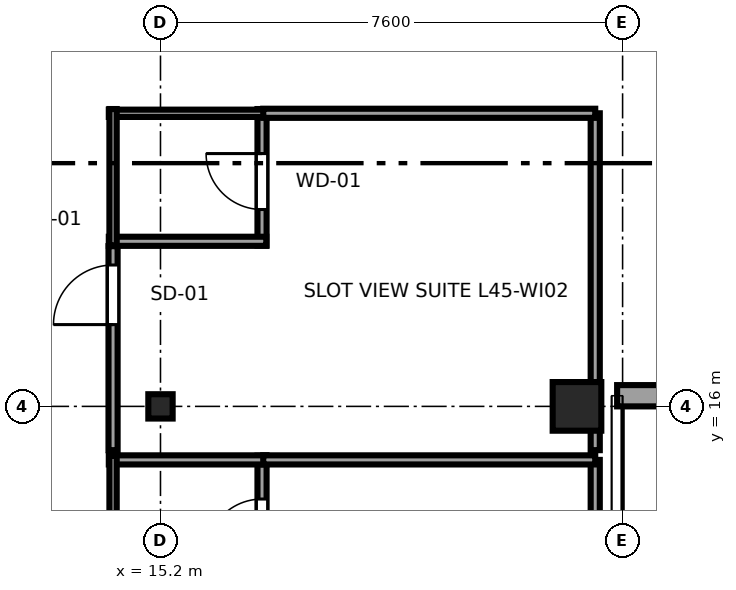
"""IFC4 building model, lengths in metres.
Left out: names, types, materials, properties, quantities, classifications, styles, units other than length and angle.
Written with IfcOpenShell. Run it as: python <this file> out.ifc"""

import sys

from ifc_helpers import new_model, si_unit, direction, frame, frame_2d, origin, origin_2d, place, context, subcontext, project, spatial, rectangle, i_section, extrude, source, transform, mapped, element, fill, save


model = new_model("IFC4")
c1 = context("Model", 3, precision=1e-05, world=origin(), true_north=direction((0.0, 1.0)))
c2 = subcontext(c1, "Body", "Model", "MODEL_VIEW")
j1 = project(units=[si_unit("LENGTHUNIT", "METRE"), si_unit("PLANEANGLEUNIT", "RADIAN")], contexts=[c1])
p1 = place(None, origin())
s1 = spatial("IfcSite", under=j1, at=p1, CompositionType="ELEMENT")
p2 = place(p1, origin())
s2 = spatial("IfcBuilding", under=s1, at=p2, CompositionType="ELEMENT")
p3 = place(p2, frame((0.0, 0.0, 171.9)))
s3 = spatial("IfcBuildingStorey", under=s2, at=p3, CompositionType="ELEMENT", Elevation=171.9)
m1 = source(origin(), c2, "Body", "SweptSolid", [
    extrude(i_section(OverallWidth=0.4, OverallDepth=0.4, WebThickness=0.02, FlangeThickness=0.035, at=origin_2d()), origin(), (0.0, 0.0, 1.0), 3.55),
])
p4 = place(p3, frame((15.2, 16.0, 0.0), z_axis=(0.0, 0.0, 1.0), x_axis=(1.0, 0.0, 0.0)))
e1 = element("IfcColumn", 1, at=p4, inside=s3, PredefinedType="COLUMN", context=c2, shape_type="MappedRepresentation", body=[
    mapped(m1, transform((0.0, 0.0, 0.0), x_axis=(1.0, 0.0, 0.0), y_axis=(0.0, 1.0, 0.0), z_axis=(0.0, 0.0, 1.0), scale=1.0)),
])
m2 = source(origin(), c2, "Body", "SweptSolid", [
    extrude(rectangle(XDim=0.8, YDim=0.8, at=origin_2d()), origin(), (0.0, 0.0, 1.0), 3.55),
])
p5 = place(p3, frame((22.05, 16.0, 0.0), z_axis=(0.0, 0.0, 1.0), x_axis=(1.0, 0.0, 0.0)))
e2 = element("IfcColumn", 2, at=p5, inside=s3, PredefinedType="COLUMN", context=c2, shape_type="MappedRepresentation", body=[
    mapped(m2, transform((0.0, 0.0, 0.0), x_axis=(1.0, 0.0, 0.0), y_axis=(0.0, 1.0, 0.0), z_axis=(0.0, 0.0, 1.0), scale=1.0)),
])
p6 = place(p3, frame((22.71, 16.175, 0.0), z_axis=(0.0, 0.0, 1.0), x_axis=(1.0, 0.0, 0.0)))
e3 = element("IfcWall", 3, at=p6, inside=s3, PredefinedType="SOLIDWALL", context=c2, shape_type="SweptSolid", body=[
    extrude(rectangle(XDim=11.58, YDim=0.35, at=frame_2d((5.79, 0.0))), origin(), (0.0, 0.0, 1.0), 2.758),
])
p7 = place(p6, frame((1.92, 0.0, 0.68)))
e4 = element("IfcOpeningElement", 4, at=p7, cuts=e3, PredefinedType="OPENING", context=c2, shape_type="SweptSolid", body=[
    extrude(rectangle(XDim=2.55, YDim=1.92, at=frame_2d((1.275, 0.96))), frame((0.0, 0.185, 0.0), z_axis=(0.0, -1.0, 0.0), x_axis=(1.0, 0.0, 0.0)), (0.0, 0.0, 1.0), 0.37),
])
p8 = place(p6, frame((7.11, 0.0, 0.68)))
e5 = element("IfcOpeningElement", 5, at=p8, cuts=e3, PredefinedType="OPENING", context=c2, shape_type="SweptSolid", body=[
    extrude(rectangle(XDim=2.55, YDim=1.92, at=frame_2d((1.275, 0.96))), frame((0.0, 0.185, 0.0), z_axis=(0.0, -1.0, 0.0), x_axis=(1.0, 0.0, 0.0)), (0.0, 0.0, 1.0), 0.37),
])
p9 = place(p3, frame((16.87, 12.983, 0.0), z_axis=(0.0, 0.0, 1.0), x_axis=(0.0, 1.0, 0.0)))
e6 = element("IfcWall", 6, at=p9, inside=s3, PredefinedType="PARTITIONING", context=c2, shape_type="SweptSolid", body=[
    extrude(rectangle(XDim=2.207, YDim=0.15, at=frame_2d((1.104, 0.0))), origin(), (0.0, 0.0, 1.0), 3.37),
])
p10 = place(p9, frame((0.573, 0.0, 0.0)))
e7 = element("IfcOpeningElement", 7, at=p10, cuts=e6, PredefinedType="OPENING", context=c2, shape_type="SweptSolid", body=[
    extrude(rectangle(XDim=0.92, YDim=2.01, at=frame_2d((0.46, 1.005))), frame((0.0, 0.085, 0.0), z_axis=(0.0, -1.0, 0.0), x_axis=(1.0, 0.0, 0.0)), (0.0, 0.0, 1.0), 0.17),
])
p11 = place(p3, frame((14.35, 15.12, 0.0), z_axis=(0.0, 0.0, 1.0), x_axis=(1.0, 0.0, 0.0)))
e8 = element("IfcWall", 8, at=p11, inside=s3, PredefinedType="PARTITIONING", context=c2, shape_type="SweptSolid", body=[
    extrude(rectangle(XDim=2.59, YDim=0.15, at=frame_2d((1.295, 0.0))), origin(), (0.0, 0.0, 1.0), 3.37),
])
p12 = place(p3, frame((14.42, 12.983, 0.0), z_axis=(0.0, 0.0, 1.0), x_axis=(0.0, 1.0, 0.0)))
e9 = element("IfcWall", 9, at=p12, inside=s3, PredefinedType="PLUMBINGWALL", context=c2, shape_type="SweptSolid", body=[
    extrude(rectangle(XDim=2.207, YDim=0.12, at=frame_2d((1.104, 0.0))), origin(), (0.0, 0.0, 1.0), 3.37),
])
p13 = place(p3, frame((16.87, 18.645, 0.0), z_axis=(0.0, 0.0, 1.0), x_axis=(0.0, 1.0, 0.0)))
e10 = element("IfcWall", 10, at=p13, inside=s3, PredefinedType="PARTITIONING", context=c2, shape_type="SweptSolid", body=[
    extrude(rectangle(XDim=2.245, YDim=0.15, at=frame_2d((1.123, 0.0))), origin(), (0.0, 0.0, 1.0), 3.37),
])
p14 = place(p13, frame((0.593, 0.0, 0.0)))
e11 = element("IfcOpeningElement", 11, at=p14, cuts=e10, PredefinedType="OPENING", context=c2, shape_type="SweptSolid", body=[
    extrude(rectangle(XDim=0.92, YDim=2.01, at=frame_2d((0.46, 1.005))), frame((0.0, 0.085, 0.0), z_axis=(0.0, -1.0, 0.0), x_axis=(1.0, 0.0, 0.0)), (0.0, 0.0, 1.0), 0.17),
])
p15 = place(p3, frame((14.35, 18.715, 0.0), z_axis=(0.0, 0.0, 1.0), x_axis=(1.0, 0.0, 0.0)))
e12 = element("IfcWall", 12, at=p15, inside=s3, PredefinedType="PARTITIONING", context=c2, shape_type="SweptSolid", body=[
    extrude(rectangle(XDim=2.59, YDim=0.15, at=frame_2d((1.295, 0.0))), origin(), (0.0, 0.0, 1.0), 3.37),
])
p16 = place(p3, frame((14.35, 20.82, 0.0), z_axis=(0.0, 0.0, 1.0), x_axis=(1.0, 0.0, 0.0)))
e13 = element("IfcWall", 13, at=p16, inside=s3, PredefinedType="PLUMBINGWALL", context=c2, shape_type="SweptSolid", body=[
    extrude(rectangle(XDim=2.59, YDim=0.12, at=frame_2d((1.295, 0.0))), origin(), (0.0, 0.0, 1.0), 3.37),
])
p17 = place(p3, frame((14.42, 18.645, 0.0), z_axis=(0.0, 0.0, 1.0), x_axis=(0.0, 1.0, 0.0)))
e14 = element("IfcWall", 14, at=p17, inside=s3, PredefinedType="PLUMBINGWALL", context=c2, shape_type="SweptSolid", body=[
    extrude(rectangle(XDim=2.245, YDim=0.12, at=frame_2d((1.123, 0.0))), origin(), (0.0, 0.0, 1.0), 3.37),
])
p18 = place(p3, frame((22.35, 9.68, 0.0), z_axis=(0.0, 0.0, 1.0), x_axis=(0.0, 1.0, 0.0)))
e15 = element("IfcWall", 15, at=p18, inside=s3, PredefinedType="PARTITIONING", context=c2, shape_type="SweptSolid", body=[
    extrude(rectangle(XDim=5.44, YDim=0.15, at=frame_2d((2.72, 0.0))), origin(), (0.0, 0.0, 1.0), 3.37),
])
p19 = place(p3, frame((16.89, 15.12, 0.0), z_axis=(0.0, 0.0, 1.0), x_axis=(1.0, 0.0, 0.0)))
e16 = element("IfcWall", 16, at=p19, inside=s3, PredefinedType="PARTITIONING", context=c2, shape_type="SweptSolid", body=[
    extrude(rectangle(XDim=5.46, YDim=0.15, at=frame_2d((2.73, 0.0))), origin(), (0.0, 0.0, 1.0), 3.37),
])
p20 = place(p3, frame((14.42, 15.28, 0.0), z_axis=(0.0, 0.0, 1.0), x_axis=(0.0, 1.0, 0.0)))
e17 = element("IfcWall", 17, at=p20, inside=s3, PredefinedType="PARTITIONING", context=c2, shape_type="SweptSolid", body=[
    extrude(rectangle(XDim=3.355, YDim=0.15, at=frame_2d((1.677, 0.0))), origin(), (0.0, 0.0, 1.0), 3.37),
])
p21 = place(p20, frame((2.065, 0.0, 0.0)))
e18 = element("IfcOpeningElement", 18, at=p21, cuts=e17, PredefinedType="OPENING", context=c2, shape_type="SweptSolid", body=[
    extrude(rectangle(XDim=0.98, YDim=2.12, at=frame_2d((0.49, 1.06))), frame((0.0, 0.085, 0.0), z_axis=(0.0, -1.0, 0.0), x_axis=(1.0, 0.0, 0.0)), (0.0, 0.0, 1.0), 0.17),
])
p22 = place(p3, frame((22.35, 15.28, 0.0), z_axis=(0.0, 0.0, 1.0), x_axis=(0.0, 1.0, 0.0)))
e19 = element("IfcWall", 19, at=p22, inside=s3, PredefinedType="PARTITIONING", context=c2, shape_type="SweptSolid", body=[
    extrude(rectangle(XDim=5.54, YDim=0.15, at=frame_2d((2.77, 0.0))), origin(), (0.0, 0.0, 1.0), 3.37),
])
p23 = place(p3, frame((16.89, 20.82, 0.0), z_axis=(0.0, 0.0, 1.0), x_axis=(1.0, 0.0, 0.0)))
e20 = element("IfcWall", 20, at=p23, inside=s3, PredefinedType="PARTITIONING", context=c2, shape_type="SweptSolid", body=[
    extrude(rectangle(XDim=5.46, YDim=0.15, at=frame_2d((2.73, 0.0))), origin(), (0.0, 0.0, 1.0), 3.37),
])
m3 = source(origin(), c2, "Body", "SweptSolid", [
    extrude(rectangle(XDim=0.92, YDim=2.01, at=frame_2d((0.46, 1.005))), frame((0.0, 0.025, 0.0), z_axis=(0.0, -1.0, 0.0), x_axis=(1.0, 0.0, 0.0)), (0.0, 0.0, 1.0), 0.05),
])
p24 = place(p10, origin())
e21 = element("IfcDoor", 21, at=p24, inside=s3, OperationType="SINGLE_SWING_LEFT", PredefinedType="DOOR", context=c2, shape_type="MappedRepresentation", body=[
    mapped(m3, transform((0.0, 0.0, 0.0), x_axis=(1.0, 0.0, 0.0), y_axis=(0.0, 1.0, 0.0), z_axis=(0.0, 0.0, 1.0), scale=1.0)),
])
fill(e7, e21)
p25 = place(p14, origin())
e22 = element("IfcDoor", 22, at=p25, inside=s3, OperationType="SINGLE_SWING_RIGHT", PredefinedType="DOOR", context=c2, shape_type="MappedRepresentation", body=[
    mapped(m3, transform((0.0, 0.0, 0.0), x_axis=(1.0, 0.0, 0.0), y_axis=(0.0, 1.0, 0.0), z_axis=(0.0, 0.0, 1.0), scale=1.0)),
])
fill(e11, e22)
m4 = source(origin(), c2, "Body", "SweptSolid", [
    extrude(rectangle(XDim=0.98, YDim=2.12, at=frame_2d((0.49, 1.06))), frame((0.0, 0.025, 0.0), z_axis=(0.0, -1.0, 0.0), x_axis=(1.0, 0.0, 0.0)), (0.0, 0.0, 1.0), 0.05),
])
p26 = place(p21, origin())
e23 = element("IfcDoor", 23, at=p26, inside=s3, OperationType="SINGLE_SWING_LEFT", PredefinedType="DOOR", context=c2, shape_type="MappedRepresentation", body=[
    mapped(m4, transform((0.0, 0.0, 0.0), x_axis=(1.0, 0.0, 0.0), y_axis=(0.0, 1.0, 0.0), z_axis=(0.0, 0.0, 1.0), scale=1.0)),
])
fill(e18, e23)
save(model, sys.argv[1])
